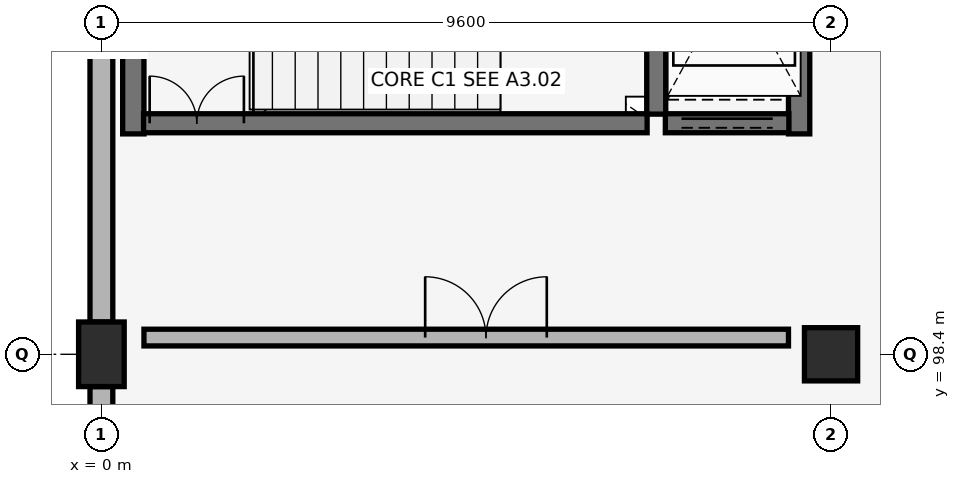
"""IFC4 building model, lengths in metres.
Left out: names, types, materials, properties, quantities, classifications, styles, units other than length and angle.
Written with IfcOpenShell. Run it as: python <this file> out.ifc"""

import sys

from ifc_helpers import new_model, si_unit, direction, frame, frame_2d, origin, origin_2d, place, context, subcontext, project, spatial, rectangle, extrude, element, fill, save


model = new_model("IFC4")
c1 = context("Model", 3, precision=1e-05, world=origin(), true_north=direction((0.0, 1.0)))
c2 = subcontext(c1, "Body", "Model", "MODEL_VIEW")
j1 = project(units=[si_unit("LENGTHUNIT", "METRE"), si_unit("PLANEANGLEUNIT", "RADIAN")], contexts=[c1])
p1 = place(None, origin())
s1 = spatial("IfcSite", under=j1, at=p1, CompositionType="ELEMENT")
p2 = place(p1, origin())
s2 = spatial("IfcBuilding", under=s1, at=p2, CompositionType="ELEMENT")
p3 = place(p2, frame((0.0, 0.0, 8.5)))
s3 = spatial("IfcBuildingStorey", under=s2, at=p3, CompositionType="ELEMENT", Elevation=8.5)
p4 = place(p3, frame((0.0, 98.4, 0.0), z_axis=(0.0, 0.0, 1.0), x_axis=(1.0, 0.0, 0.0)))
e1 = element("IfcColumn", 1, at=p4, inside=s3, PredefinedType="COLUMN", context=c2, shape_type="SweptSolid", body=[
    extrude(rectangle(XDim=0.6, YDim=0.85, at=origin_2d()), origin(), (0.0, 0.0, 1.0), 4.08),
])
p5 = place(p3, frame((9.6, 98.4, 0.0), z_axis=(0.0, 0.0, 1.0), x_axis=(1.0, 0.0, 0.0)))
e2 = element("IfcColumn", 2, at=p5, inside=s3, PredefinedType="COLUMN", context=c2, shape_type="SweptSolid", body=[
    extrude(rectangle(XDim=0.7, YDim=0.7, at=origin_2d()), origin(), (0.0, 0.0, 1.0), 4.08),
])
for number, where, z_axis, x_axis in (
    (3, (0.0, 97.975, 0.0), (0.0, 0.0, 1.0), (0.0, -1.0, 0.0)),
    (4, (0.0, 105.175, 0.0), (0.0, 0.0, 1.0), (0.0, -1.0, 0.0)),
):
    element("IfcWall", number, at=place(p3, frame(where, z_axis=z_axis, x_axis=x_axis)), inside=s3, PredefinedType="SOLIDWALL", context=c2, shape_type="SweptSolid", body=[
        extrude(rectangle(XDim=6.35, YDim=0.3, at=frame_2d((3.175, 0.0))), origin(), (0.0, 0.0, 1.0), 3.08),
    ])
for number, where, z_axis, x_axis in (
    (5, (0.42, 101.3, 0.0), (0.0, 0.0, 1.0), (0.0, 1.0, 0.0)),
    (6, (9.18, 101.3, 0.0), (0.0, 0.0, 1.0), (0.0, 1.0, 0.0)),
):
    element("IfcWall", number, at=place(p3, frame(where, z_axis=z_axis, x_axis=x_axis)), inside=s3, PredefinedType="SHEAR", context=c2, shape_type="SweptSolid", body=[
        extrude(rectangle(XDim=4.08, YDim=0.28, at=frame_2d((2.04, 0.0))), origin(), (0.0, 0.0, 1.0), 3.8),
    ])
p6 = place(p3, frame((7.3, 101.56, 0.0), z_axis=(0.0, 0.0, 1.0), x_axis=(0.0, 1.0, 0.0)))
e7 = element("IfcWall", 7, at=p6, inside=s3, PredefinedType="SHEAR", context=c2, shape_type="SweptSolid", body=[
    extrude(rectangle(XDim=3.54, YDim=0.25, at=frame_2d((1.77, 0.0))), origin(), (0.0, 0.0, 1.0), 3.8),
])
p7 = place(p3, frame((0.555, 101.44, 0.0), z_axis=(0.0, 0.0, 1.0), x_axis=(1.0, 0.0, 0.0)))
e8 = element("IfcWall", 8, at=p7, inside=s3, PredefinedType="SHEAR", context=c2, shape_type="SweptSolid", body=[
    extrude(rectangle(XDim=6.625, YDim=0.25, at=frame_2d((3.312, 0.0))), origin(), (0.0, 0.0, 1.0), 3.8),
])
p8 = place(p7, frame((0.08, 0.0, 0.0)))
e9 = element("IfcOpeningElement", 9, at=p8, cuts=e8, PredefinedType="OPENING", context=c2, shape_type="SweptSolid", body=[
    extrude(rectangle(XDim=1.24, YDim=2.15, at=frame_2d((0.62, 1.075))), frame((0.0, 0.135, 0.0), z_axis=(0.0, -1.0, 0.0), x_axis=(1.0, 0.0, 0.0)), (0.0, 0.0, 1.0), 0.27),
])
p9 = place(p3, frame((0.56, 98.62, 0.0), z_axis=(0.0, 0.0, 1.0), x_axis=(1.0, 0.0, 0.0)))
e10 = element("IfcWall", 10, at=p9, inside=s3, PredefinedType="PARTITIONING", context=c2, shape_type="SweptSolid", body=[
    extrude(rectangle(XDim=8.48, YDim=0.22, at=frame_2d((4.24, 0.0))), origin(), (0.0, 0.0, 1.0), 3.13),
])
p10 = place(p9, frame((3.7, 0.0, 0.0)))
e11 = element("IfcOpeningElement", 11, at=p10, cuts=e10, PredefinedType="OPENING", context=c2, shape_type="SweptSolid", body=[
    extrude(rectangle(XDim=1.6, YDim=2.2, at=frame_2d((0.8, 1.1))), frame((0.0, 0.12, 0.0), z_axis=(0.0, -1.0, 0.0), x_axis=(1.0, 0.0, 0.0)), (0.0, 0.0, 1.0), 0.24),
])
p11 = place(p3, frame((7.42, 101.44, 0.0), z_axis=(0.0, 0.0, 1.0), x_axis=(1.0, 0.0, 0.0)))
e12 = element("IfcWall", 12, at=p11, inside=s3, PredefinedType="SHEAR", context=c2, shape_type="SweptSolid", body=[
    extrude(rectangle(XDim=1.625, YDim=0.25, at=frame_2d((0.812, 0.0))), origin(), (0.0, 0.0, 1.0), 3.8),
])
p12 = place(p11, frame((0.212, 0.0, 0.0)))
e13 = element("IfcOpeningElement", 13, at=p12, cuts=e12, PredefinedType="OPENING", context=c2, shape_type="SweptSolid", body=[
    extrude(rectangle(XDim=1.2, YDim=2.15, at=frame_2d((0.6, 1.075))), frame((0.0, 0.135, 0.0), z_axis=(0.0, -1.0, 0.0), x_axis=(1.0, 0.0, 0.0)), (0.0, 0.0, 1.0), 0.27),
])
p13 = place(p8, origin())
e14 = element("IfcDoor", 14, at=p13, inside=s3, OperationType="DOUBLE_DOOR_SINGLE_SWING", PredefinedType="DOOR", context=c2, shape_type="SweptSolid", body=[
    extrude(rectangle(XDim=1.24, YDim=2.15, at=frame_2d((0.62, 1.075))), frame((0.0, 0.025, 0.0), z_axis=(0.0, -1.0, 0.0), x_axis=(1.0, 0.0, 0.0)), (0.0, 0.0, 1.0), 0.05),
])
fill(e9, e14)
p14 = place(p10, origin())
e15 = element("IfcDoor", 15, at=p14, inside=s3, OperationType="DOUBLE_DOOR_SINGLE_SWING", PredefinedType="DOOR", context=c2, shape_type="SweptSolid", body=[
    extrude(rectangle(XDim=1.6, YDim=2.2, at=frame_2d((0.8, 1.1))), frame((0.0, 0.025, 0.0), z_axis=(0.0, -1.0, 0.0), x_axis=(1.0, 0.0, 0.0)), (0.0, 0.0, 1.0), 0.05),
])
fill(e11, e15)
p15 = place(p12, origin())
e16 = element("IfcDoor", 16, at=p15, inside=s3, OperationType="DOUBLE_DOOR_SLIDING", PredefinedType="DOOR", context=c2, shape_type="SweptSolid", body=[
    extrude(rectangle(XDim=1.2, YDim=2.15, at=frame_2d((0.6, 1.075))), frame((0.0, 0.025, 0.0), z_axis=(0.0, -1.0, 0.0), x_axis=(1.0, 0.0, 0.0)), (0.0, 0.0, 1.0), 0.05),
])
fill(e13, e16)
save(model, sys.argv[1])
